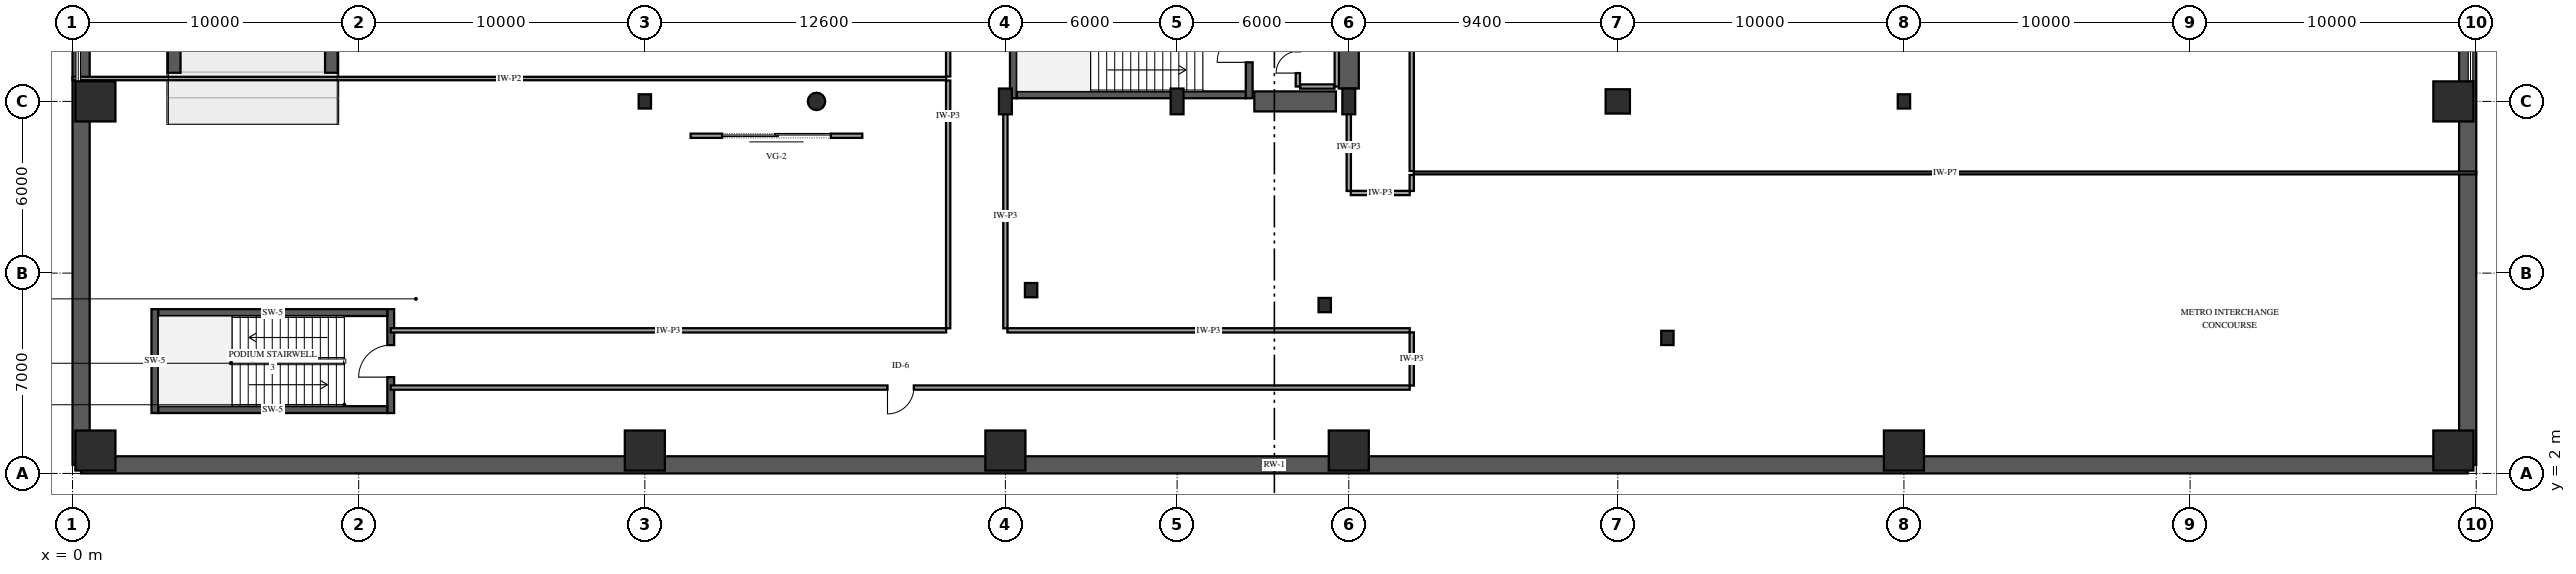
"""IFC4 building model, lengths in metres.
Left out: names, types, materials, properties, quantities, classifications, styles, units other than length and angle.
Written with IfcOpenShell. Run it as: python <this file> out.ifc"""

import sys

from ifc_helpers import new_model, si_unit, direction, frame, frame_2d, origin, origin_2d, place, context, subcontext, project, spatial, rectangle, hollow_circle, i_section, extrude, element, fill, save


model = new_model("IFC4")
c1 = context("Model", 3, precision=1e-05, world=origin(), true_north=direction((0.0, 1.0)))
c2 = subcontext(c1, "Body", "Model", "MODEL_VIEW")
j1 = project(units=[si_unit("LENGTHUNIT", "METRE"), si_unit("PLANEANGLEUNIT", "RADIAN")], contexts=[c1])
p1 = place(None, origin())
s1 = spatial("IfcSite", under=j1, at=p1, CompositionType="ELEMENT")
p2 = place(p1, origin())
s2 = spatial("IfcBuilding", under=s1, at=p2, CompositionType="ELEMENT")
p3 = place(p2, frame((0.0, 0.0, -5.4)))
s3 = spatial("IfcBuildingStorey", under=s2, at=p3, CompositionType="ELEMENT", Elevation=-5.4)
for number, where, z_axis, x_axis in (
    (1, (3.55, 16.0, 0.0), (0.0, 0.0, 1.0), (0.0, 1.0, 0.0)),
    (2, (9.05, 16.0, 0.0), (0.0, 0.0, 1.0), (0.0, 1.0, 0.0)),
):
    element("IfcWall", number, at=place(p3, frame(where, z_axis=z_axis, x_axis=x_axis)), inside=s3, PredefinedType="SHEAR", context=c2, shape_type="SweptSolid", body=[
        extrude(rectangle(XDim=12.0, YDim=0.45, at=frame_2d((6.0, 0.0))), origin(), (0.0, 0.0, 1.0), 1.95),
    ])
p4 = place(p3, frame((0.3, 2.3, 0.0), z_axis=(0.0, 0.0, 1.0), x_axis=(1.0, 0.0, 0.0)))
e3 = element("IfcWall", 3, at=p4, inside=s3, PredefinedType="USERDEFINED", context=c2, shape_type="SweptSolid", body=[
    extrude(rectangle(XDim=83.4, YDim=0.6, at=frame_2d((41.7, 0.0))), origin(), (0.0, 0.0, 1.0), 5.4),
])
for number, where, z_axis, x_axis in (
    (4, (83.7, 2.3, 0.0), (0.0, 0.0, 1.0), (0.0, 1.0, 0.0)),
    (5, (0.3, 47.7, 0.0), (0.0, 0.0, 1.0), (0.0, -1.0, 0.0)),
):
    element("IfcWall", number, at=place(p3, frame(where, z_axis=z_axis, x_axis=x_axis)), inside=s3, PredefinedType="USERDEFINED", context=c2, shape_type="SweptSolid", body=[
        extrude(rectangle(XDim=45.4, YDim=0.6, at=frame_2d((22.7, 0.0))), origin(), (0.0, 0.0, 1.0), 5.4),
    ])
p5 = place(p3, frame((32.88, 15.11, 0.0), z_axis=(0.0, 0.0, 1.0), x_axis=(0.0, 1.0, 0.0)))
e6 = element("IfcWall", 6, at=p5, inside=s3, PredefinedType="SHEAR", context=c2, shape_type="SweptSolid", body=[
    extrude(rectangle(XDim=3.63, YDim=0.24, at=frame_2d((1.815, 0.0))), origin(), (0.0, 0.0, 1.0), 5.4),
])
p6 = place(p3, frame((41.12, 15.11, 0.0), z_axis=(0.0, 0.0, 1.0), x_axis=(0.0, 1.0, 0.0)))
e7 = element("IfcWall", 7, at=p6, inside=s3, PredefinedType="SHEAR", context=c2, shape_type="SweptSolid", body=[
    extrude(rectangle(XDim=3.63, YDim=0.24, at=frame_2d((1.815, 0.0))), origin(), (0.0, 0.0, 1.0), 5.4),
])
p7 = place(p6, frame((1.255, 0.0, 0.0)))
e8 = element("IfcOpeningElement", 8, at=p7, cuts=e7, PredefinedType="OPENING", context=c2, shape_type="SweptSolid", body=[
    extrude(rectangle(XDim=1.12, YDim=2.15, at=frame_2d((0.56, 1.075))), frame((0.0, 0.13, 0.0), z_axis=(0.0, -1.0, 0.0), x_axis=(1.0, 0.0, 0.0)), (0.0, 0.0, 1.0), 0.26),
])
p8 = place(p3, frame((33.0, 15.23, 0.0), z_axis=(0.0, 0.0, 1.0), x_axis=(1.0, 0.0, 0.0)))
e9 = element("IfcWall", 9, at=p8, inside=s3, PredefinedType="SHEAR", context=c2, shape_type="SweptSolid", body=[
    extrude(rectangle(XDim=8.0, YDim=0.24, at=frame_2d((4.0, 0.0))), origin(), (0.0, 0.0, 1.0), 5.4),
])
p9 = place(p3, frame((2.88, 4.11, 0.0), z_axis=(0.0, 0.0, 1.0), x_axis=(0.0, 1.0, 0.0)))
e10 = element("IfcWall", 10, at=p9, inside=s3, PredefinedType="SHEAR", context=c2, shape_type="SweptSolid", body=[
    extrude(rectangle(XDim=3.63, YDim=0.24, at=frame_2d((1.815, 0.0))), origin(), (0.0, 0.0, 1.0), 5.4),
])
p10 = place(p3, frame((11.12, 4.11, 0.0), z_axis=(0.0, 0.0, 1.0), x_axis=(0.0, 1.0, 0.0)))
e11 = element("IfcWall", 11, at=p10, inside=s3, PredefinedType="SHEAR", context=c2, shape_type="SweptSolid", body=[
    extrude(rectangle(XDim=3.63, YDim=0.24, at=frame_2d((1.815, 0.0))), origin(), (0.0, 0.0, 1.0), 5.4),
])
p11 = place(p10, frame((1.255, 0.0, 0.0)))
e12 = element("IfcOpeningElement", 12, at=p11, cuts=e11, PredefinedType="OPENING", context=c2, shape_type="SweptSolid", body=[
    extrude(rectangle(XDim=1.12, YDim=2.15, at=frame_2d((0.56, 1.075))), frame((0.0, 0.13, 0.0), z_axis=(0.0, -1.0, 0.0), x_axis=(1.0, 0.0, 0.0)), (0.0, 0.0, 1.0), 0.26),
])
for number, where, z_axis, x_axis in (
    (13, (3.0, 4.23, 0.0), (0.0, 0.0, 1.0), (1.0, 0.0, 0.0)),
    (14, (3.0, 7.62, 0.0), (0.0, 0.0, 1.0), (1.0, 0.0, 0.0)),
):
    element("IfcWall", number, at=place(p3, frame(where, z_axis=z_axis, x_axis=x_axis)), inside=s3, PredefinedType="SHEAR", context=c2, shape_type="SweptSolid", body=[
        extrude(rectangle(XDim=8.0, YDim=0.24, at=frame_2d((4.0, 0.0))), origin(), (0.0, 0.0, 1.0), 5.4),
    ])
p12 = place(p3, frame((41.3, 15.0, 0.0), z_axis=(0.0, 0.0, 1.0), x_axis=(1.0, 0.0, 0.0)))
e15 = element("IfcWall", 15, at=p12, inside=s3, PredefinedType="SHEAR", context=c2, shape_type="SweptSolid", body=[
    extrude(rectangle(XDim=2.85, YDim=0.7, at=frame_2d((1.425, 0.0))), origin(), (0.0, 0.0, 1.0), 5.4),
])
p13 = place(p3, frame((44.6, 15.45, 0.0), z_axis=(0.0, 0.0, 1.0), x_axis=(0.0, 1.0, 0.0)))
e16 = element("IfcWall", 16, at=p13, inside=s3, PredefinedType="SHEAR", context=c2, shape_type="SweptSolid", body=[
    extrude(rectangle(XDim=6.35, YDim=0.7, at=frame_2d((3.175, 0.0))), origin(), (0.0, 0.0, 1.0), 5.4),
])
for number, where, z_axis, x_axis in (
    (17, (32.6, 15.0, 0.0), (0.0, 0.0, 1.0), (1.0, 0.0, 0.0)),
    (18, (38.6, 15.0, 0.0), (0.0, 0.0, 1.0), (1.0, 0.0, 0.0)),
    (19, (44.6, 15.0, 0.0), (0.0, 0.0, 1.0), (1.0, 0.0, 0.0)),
):
    element("IfcColumn", number, at=place(p3, frame(where, z_axis=z_axis, x_axis=x_axis)), inside=s3, PredefinedType="PILASTER", context=c2, shape_type="SweptSolid", body=[
        extrude(rectangle(XDim=0.45, YDim=0.9, at=origin_2d()), origin(), (0.0, 0.0, 1.0), 5.4),
    ])
for number, where, z_axis, x_axis in (
    (20, (0.8, 2.8, 0.0), (0.0, 0.0, 1.0), (1.0, 0.0, 0.0)),
    (21, (20.0, 2.8, 0.0), (0.0, 0.0, 1.0), (1.0, 0.0, 0.0)),
    (22, (64.0, 2.8, 0.0), (0.0, 0.0, 1.0), (1.0, 0.0, 0.0)),
    (23, (83.2, 2.8, 0.0), (0.0, 0.0, 1.0), (1.0, 0.0, 0.0)),
    (24, (0.8, 15.0, 0.0), (0.0, 0.0, 1.0), (1.0, 0.0, 0.0)),
):
    element("IfcColumn", number, at=place(p3, frame(where, z_axis=z_axis, x_axis=x_axis)), inside=s3, PredefinedType="COLUMN", context=c2, shape_type="SweptSolid", body=[
        extrude(rectangle(XDim=1.4, YDim=1.4, at=origin_2d()), origin(), (0.0, 0.0, 1.0), 5.4),
    ])
for number, where, z_axis, x_axis in (
    (25, (20.0, 15.0, 0.0), (0.0, 0.0, 1.0), (1.0, 0.0, 0.0)),
    (26, (64.0, 15.0, 0.0), (0.0, 0.0, 1.0), (1.0, 0.0, 0.0)),
):
    element("IfcColumn", number, at=place(p3, frame(where, z_axis=z_axis, x_axis=x_axis)), inside=s3, PredefinedType="COLUMN", context=c2, shape_type="SweptSolid", body=[
        extrude(i_section(OverallWidth=0.432, OverallDepth=0.498, WebThickness=0.056, FlangeThickness=0.089, FilletRadius=0.038, at=origin_2d()), origin(), (0.0, 0.0, 1.0), 5.4),
    ])
for number, where, z_axis, x_axis in (
    (27, (83.2, 15.0, 0.0), (0.0, 0.0, 1.0), (1.0, 0.0, 0.0)),
    (28, (32.6, 2.8, 0.0), (0.0, 0.0, 1.0), (1.0, 0.0, 0.0)),
    (29, (44.6, 2.8, 0.0), (0.0, 0.0, 1.0), (1.0, 0.0, 0.0)),
):
    element("IfcColumn", number, at=place(p3, frame(where, z_axis=z_axis, x_axis=x_axis)), inside=s3, PredefinedType="COLUMN", context=c2, shape_type="SweptSolid", body=[
        extrude(rectangle(XDim=1.4, YDim=1.4, at=origin_2d()), origin(), (0.0, 0.0, 1.0), 5.4),
    ])
p14 = place(p3, frame((54.0, 15.0, 0.0), z_axis=(0.0, 0.0, 1.0), x_axis=(1.0, 0.0, 0.0)))
e30 = element("IfcColumn", 30, at=p14, inside=s3, PredefinedType="COLUMN", context=c2, shape_type="SweptSolid", body=[
    extrude(rectangle(XDim=0.85, YDim=0.85, at=origin_2d()), origin(), (0.0, 0.0, 1.0), 5.4),
])
p15 = place(p3, frame((26.0, 15.0, 0.0), z_axis=(0.0, 0.0, 1.0), x_axis=(1.0, 0.0, 0.0)))
e31 = element("IfcColumn", 31, at=p15, inside=s3, PredefinedType="COLUMN", context=c2, shape_type="SweptSolid", body=[
    extrude(hollow_circle(Radius=0.305, WallThickness=0.022, at=origin_2d()), origin(), (0.0, 0.0, 1.0), 5.4),
])
for number, where, z_axis, x_axis in (
    (32, (33.498, 8.405, 0.0), (0.0, 0.0, 1.0), (1.0, 0.0, 0.0)),
    (33, (43.759, 7.883, 0.0), (0.0, 0.0, 1.0), (1.0, 0.0, 0.0)),
    (34, (55.734, 6.735, 0.0), (0.0, 0.0, 1.0), (1.0, 0.0, 0.0)),
):
    element("IfcColumn", number, at=place(p3, frame(where, z_axis=z_axis, x_axis=x_axis)), inside=s3, PredefinedType="COLUMN", context=c2, shape_type="SweptSolid", body=[
        extrude(i_section(OverallWidth=0.432, OverallDepth=0.498, WebThickness=0.056, FlangeThickness=0.089, FilletRadius=0.038, at=origin_2d()), origin(), (0.0, 0.0, 1.0), 5.4),
    ])
p16 = place(p3, frame((21.6, 13.8, 0.0), z_axis=(0.0, 0.0, 1.0), x_axis=(1.0, 0.0, 0.0)))
e35 = element("IfcWall", 35, at=p16, inside=s3, PredefinedType="PARTITIONING", context=c2, shape_type="SweptSolid", body=[
    extrude(rectangle(XDim=6.0, YDim=0.15, at=frame_2d((3.0, 0.0))), origin(), (0.0, 0.0, 1.0), 3.0),
])
p17 = place(p16, frame((1.1, 0.0, 0.0)))
e36 = element("IfcOpeningElement", 36, at=p17, cuts=e35, PredefinedType="OPENING", context=c2, shape_type="SweptSolid", body=[
    extrude(rectangle(XDim=3.8, YDim=2.55, at=frame_2d((1.9, 1.275))), frame((0.0, 0.085, 0.0), z_axis=(0.0, -1.0, 0.0), x_axis=(1.0, 0.0, 0.0)), (0.0, 0.0, 1.0), 0.17),
])
p18 = place(p3, frame((42.9, 15.52, 0.0), z_axis=(0.0, 0.0, 1.0), x_axis=(1.0, 0.0, 0.0)))
e37 = element("IfcWall", 37, at=p18, inside=s3, PredefinedType="PARTITIONING", context=c2, shape_type="SweptSolid", body=[
    extrude(rectangle(XDim=1.2, YDim=0.15, at=frame_2d((0.6, 0.0))), origin(), (0.0, 0.0, 1.0), 5.08),
])
p19 = place(p3, frame((44.18, 15.52, 0.0), z_axis=(0.0, 0.0, 1.0), x_axis=(0.0, 1.0, 0.0)))
e38 = element("IfcWall", 38, at=p19, inside=s3, PredefinedType="PARTITIONING", context=c2, shape_type="SweptSolid", body=[
    extrude(rectangle(XDim=1.7, YDim=0.15, at=frame_2d((0.85, 0.0))), origin(), (0.0, 0.0, 1.0), 5.08),
])
p20 = place(p3, frame((42.82, 15.52, 0.0), z_axis=(0.0, 0.0, 1.0), x_axis=(0.0, 1.0, 0.0)))
e39 = element("IfcWall", 39, at=p20, inside=s3, PredefinedType="PARTITIONING", context=c2, shape_type="SweptSolid", body=[
    extrude(rectangle(XDim=1.7, YDim=0.15, at=frame_2d((0.85, 0.0))), origin(), (0.0, 0.0, 1.0), 5.08),
])
p21 = place(p20, frame((0.47, 0.0, 0.0)))
e40 = element("IfcOpeningElement", 40, at=p21, cuts=e39, PredefinedType="OPENING", context=c2, shape_type="SweptSolid", body=[
    extrude(rectangle(XDim=0.76, YDim=2.0, at=frame_2d((0.38, 1.0))), frame((0.0, 0.085, 0.0), z_axis=(0.0, -1.0, 0.0), x_axis=(1.0, 0.0, 0.0)), (0.0, 0.0, 1.0), 0.17),
])
p22 = place(p3, frame((46.87, 12.5, 0.0), z_axis=(0.0, 0.0, 1.0), x_axis=(1.0, 0.0, 0.0)))
e41 = element("IfcWall", 41, at=p22, inside=s3, PredefinedType="PARTITIONING", context=c2, shape_type="SweptSolid", body=[
    extrude(rectangle(XDim=37.13, YDim=0.1, at=frame_2d((18.565, 0.0))), origin(), (0.0, 0.0, 1.0), 5.08),
])
p23 = place(p3, frame((46.73, 5.0, 0.0), z_axis=(0.0, 0.0, 1.0), x_axis=(-1.0, 0.0, 0.0)))
e42 = element("IfcWall", 42, at=p23, inside=s3, PredefinedType="PARTITIONING", context=c2, shape_type="SweptSolid", body=[
    extrude(rectangle(XDim=35.61, YDim=0.15, at=frame_2d((17.805, 0.0))), origin(), (0.0, 0.0, 1.0), 5.08),
])
p24 = place(p23, frame((17.33, 0.0, 0.0)))
e43 = element("IfcOpeningElement", 43, at=p24, cuts=e42, PredefinedType="OPENING", context=c2, shape_type="SweptSolid", body=[
    extrude(rectangle(XDim=0.92, YDim=2.12, at=frame_2d((0.46, 1.06))), frame((0.0, 0.085, 0.0), z_axis=(0.0, -1.0, 0.0), x_axis=(1.0, 0.0, 0.0)), (0.0, 0.0, 1.0), 0.17),
])
p25 = place(p3, frame((0.0, 15.8, 0.0), z_axis=(0.0, 0.0, 1.0), x_axis=(1.0, 0.0, 0.0)))
e44 = element("IfcWall", 44, at=p25, inside=s3, PredefinedType="PARTITIONING", context=c2, shape_type="SweptSolid", body=[
    extrude(rectangle(XDim=30.53, YDim=0.12, at=frame_2d((15.265, 0.0))), origin(), (0.0, 0.0, 1.0), 5.08),
])
p26 = place(p3, frame((46.8, 37.43, 0.0), z_axis=(0.0, 0.0, 1.0), x_axis=(0.0, -1.0, 0.0)))
e45 = element("IfcWall", 45, at=p26, inside=s3, PredefinedType="PARTITIONING", context=c2, shape_type="SweptSolid", body=[
    extrude(rectangle(XDim=24.86, YDim=0.15, at=frame_2d((12.43, 0.0))), origin(), (0.0, 0.0, 1.0), 5.08),
])
p27 = place(p26, frame((11.955, 0.0, 0.0)))
e46 = element("IfcOpeningElement", 46, at=p27, cuts=e45, PredefinedType="OPENING", context=c2, shape_type="SweptSolid", body=[
    extrude(rectangle(XDim=0.92, YDim=2.12, at=frame_2d((0.46, 1.06))), frame((0.0, 0.085, 0.0), z_axis=(0.0, -1.0, 0.0), x_axis=(1.0, 0.0, 0.0)), (0.0, 0.0, 1.0), 0.17),
])
p28 = place(p3, frame((11.12, 7.0, 0.0), z_axis=(0.0, 0.0, 1.0), x_axis=(1.0, 0.0, 0.0)))
e47 = element("IfcWall", 47, at=p28, inside=s3, PredefinedType="PARTITIONING", context=c2, shape_type="SweptSolid", body=[
    extrude(rectangle(XDim=19.41, YDim=0.15, at=frame_2d((9.705, 0.0))), origin(), (0.0, 0.0, 1.0), 5.08),
])
p29 = place(p3, frame((32.67, 7.0, 0.0), z_axis=(0.0, 0.0, 1.0), x_axis=(1.0, 0.0, 0.0)))
e48 = element("IfcWall", 48, at=p29, inside=s3, PredefinedType="PARTITIONING", context=c2, shape_type="SweptSolid", body=[
    extrude(rectangle(XDim=14.06, YDim=0.15, at=frame_2d((7.03, 0.0))), origin(), (0.0, 0.0, 1.0), 5.08),
])
p30 = place(p3, frame((30.6, 7.07, 0.0), z_axis=(0.0, 0.0, 1.0), x_axis=(0.0, 1.0, 0.0)))
e49 = element("IfcWall", 49, at=p30, inside=s3, PredefinedType="PARTITIONING", context=c2, shape_type="SweptSolid", body=[
    extrude(rectangle(XDim=8.66, YDim=0.15, at=frame_2d((4.33, 0.0))), origin(), (0.0, 0.0, 1.0), 5.08),
])
p31 = place(p3, frame((32.6, 14.93, 0.0), z_axis=(0.0, 0.0, 1.0), x_axis=(0.0, -1.0, 0.0)))
e50 = element("IfcWall", 50, at=p31, inside=s3, PredefinedType="PARTITIONING", context=c2, shape_type="SweptSolid", body=[
    extrude(rectangle(XDim=7.86, YDim=0.15, at=frame_2d((3.93, 0.0))), origin(), (0.0, 0.0, 1.0), 4.202),
])
p32 = place(p3, frame((30.6, 15.87, 0.0), z_axis=(0.0, 0.0, 1.0), x_axis=(0.0, 1.0, 0.0)))
e51 = element("IfcWall", 51, at=p32, inside=s3, PredefinedType="PARTITIONING", context=c2, shape_type="SweptSolid", body=[
    extrude(rectangle(XDim=6.06, YDim=0.15, at=frame_2d((3.03, 0.0))), origin(), (0.0, 0.0, 1.0), 5.08),
])
p33 = place(p3, frame((44.6, 11.87, 0.0), z_axis=(0.0, 0.0, 1.0), x_axis=(0.0, 1.0, 0.0)))
e52 = element("IfcWall", 52, at=p33, inside=s3, PredefinedType="PARTITIONING", context=c2, shape_type="SweptSolid", body=[
    extrude(rectangle(XDim=3.06, YDim=0.15, at=frame_2d((1.53, 0.0))), origin(), (0.0, 0.0, 1.0), 4.202),
])
p34 = place(p3, frame((46.73, 11.8, 0.0), z_axis=(0.0, 0.0, 1.0), x_axis=(-1.0, 0.0, 0.0)))
e53 = element("IfcWall", 53, at=p34, inside=s3, PredefinedType="PARTITIONING", context=c2, shape_type="SweptSolid", body=[
    extrude(rectangle(XDim=2.06, YDim=0.15, at=frame_2d((1.03, 0.0))), origin(), (0.0, 0.0, 1.0), 5.08),
])
p35 = place(p3, frame((46.8, 6.93, 0.0), z_axis=(0.0, 0.0, 1.0), x_axis=(0.0, -1.0, 0.0)))
e54 = element("IfcWall", 54, at=p35, inside=s3, PredefinedType="PARTITIONING", context=c2, shape_type="SweptSolid", body=[
    extrude(rectangle(XDim=1.86, YDim=0.15, at=frame_2d((0.93, 0.0))), origin(), (0.0, 0.0, 1.0), 5.08),
])
p36 = place(p3, frame((46.8, 12.43, 0.0), z_axis=(0.0, 0.0, 1.0), x_axis=(0.0, -1.0, 0.0)))
e55 = element("IfcWall", 55, at=p36, inside=s3, PredefinedType="PARTITIONING", context=c2, shape_type="SweptSolid", body=[
    extrude(rectangle(XDim=0.56, YDim=0.15, at=frame_2d((0.28, 0.0))), origin(), (0.0, 0.0, 1.0), 5.08),
])
p37 = place(p17, origin())
e56 = element("IfcDoor", 56, at=p37, inside=s3, OperationType="SINGLE_SWING_LEFT", PredefinedType="GATE", context=c2, shape_type="SweptSolid", body=[
    extrude(rectangle(XDim=3.8, YDim=2.55, at=frame_2d((1.9, 1.275))), frame((0.0, 0.025, 0.0), z_axis=(0.0, -1.0, 0.0), x_axis=(1.0, 0.0, 0.0)), (0.0, 0.0, 1.0), 0.05),
])
fill(e36, e56)
p38 = place(p7, origin())
e57 = element("IfcDoor", 57, at=p38, inside=s3, OperationType="SINGLE_SWING_LEFT", PredefinedType="DOOR", context=c2, shape_type="SweptSolid", body=[
    extrude(rectangle(XDim=1.12, YDim=2.15, at=frame_2d((0.56, 1.075))), frame((0.0, 0.025, 0.0), z_axis=(0.0, -1.0, 0.0), x_axis=(1.0, 0.0, 0.0)), (0.0, 0.0, 1.0), 0.05),
])
fill(e8, e57)
p39 = place(p11, origin())
e58 = element("IfcDoor", 58, at=p39, inside=s3, OperationType="SINGLE_SWING_LEFT", PredefinedType="DOOR", context=c2, shape_type="SweptSolid", body=[
    extrude(rectangle(XDim=1.12, YDim=2.15, at=frame_2d((0.56, 1.075))), frame((0.0, 0.025, 0.0), z_axis=(0.0, -1.0, 0.0), x_axis=(1.0, 0.0, 0.0)), (0.0, 0.0, 1.0), 0.05),
])
fill(e12, e58)
p40 = place(p21, origin())
e59 = element("IfcDoor", 59, at=p40, inside=s3, OperationType="SINGLE_SWING_LEFT", PredefinedType="TRAPDOOR", context=c2, shape_type="SweptSolid", body=[
    extrude(rectangle(XDim=0.76, YDim=2.0, at=frame_2d((0.38, 1.0))), frame((0.0, 0.025, 0.0), z_axis=(0.0, -1.0, 0.0), x_axis=(1.0, 0.0, 0.0)), (0.0, 0.0, 1.0), 0.05),
])
fill(e40, e59)
p41 = place(p24, origin())
e60 = element("IfcDoor", 60, at=p41, inside=s3, OperationType="SINGLE_SWING_RIGHT", PredefinedType="DOOR", context=c2, shape_type="SweptSolid", body=[
    extrude(rectangle(XDim=0.92, YDim=2.12, at=frame_2d((0.46, 1.06))), frame((0.0, 0.025, 0.0), z_axis=(0.0, -1.0, 0.0), x_axis=(1.0, 0.0, 0.0)), (0.0, 0.0, 1.0), 0.05),
])
fill(e43, e60)
save(model, sys.argv[1])
